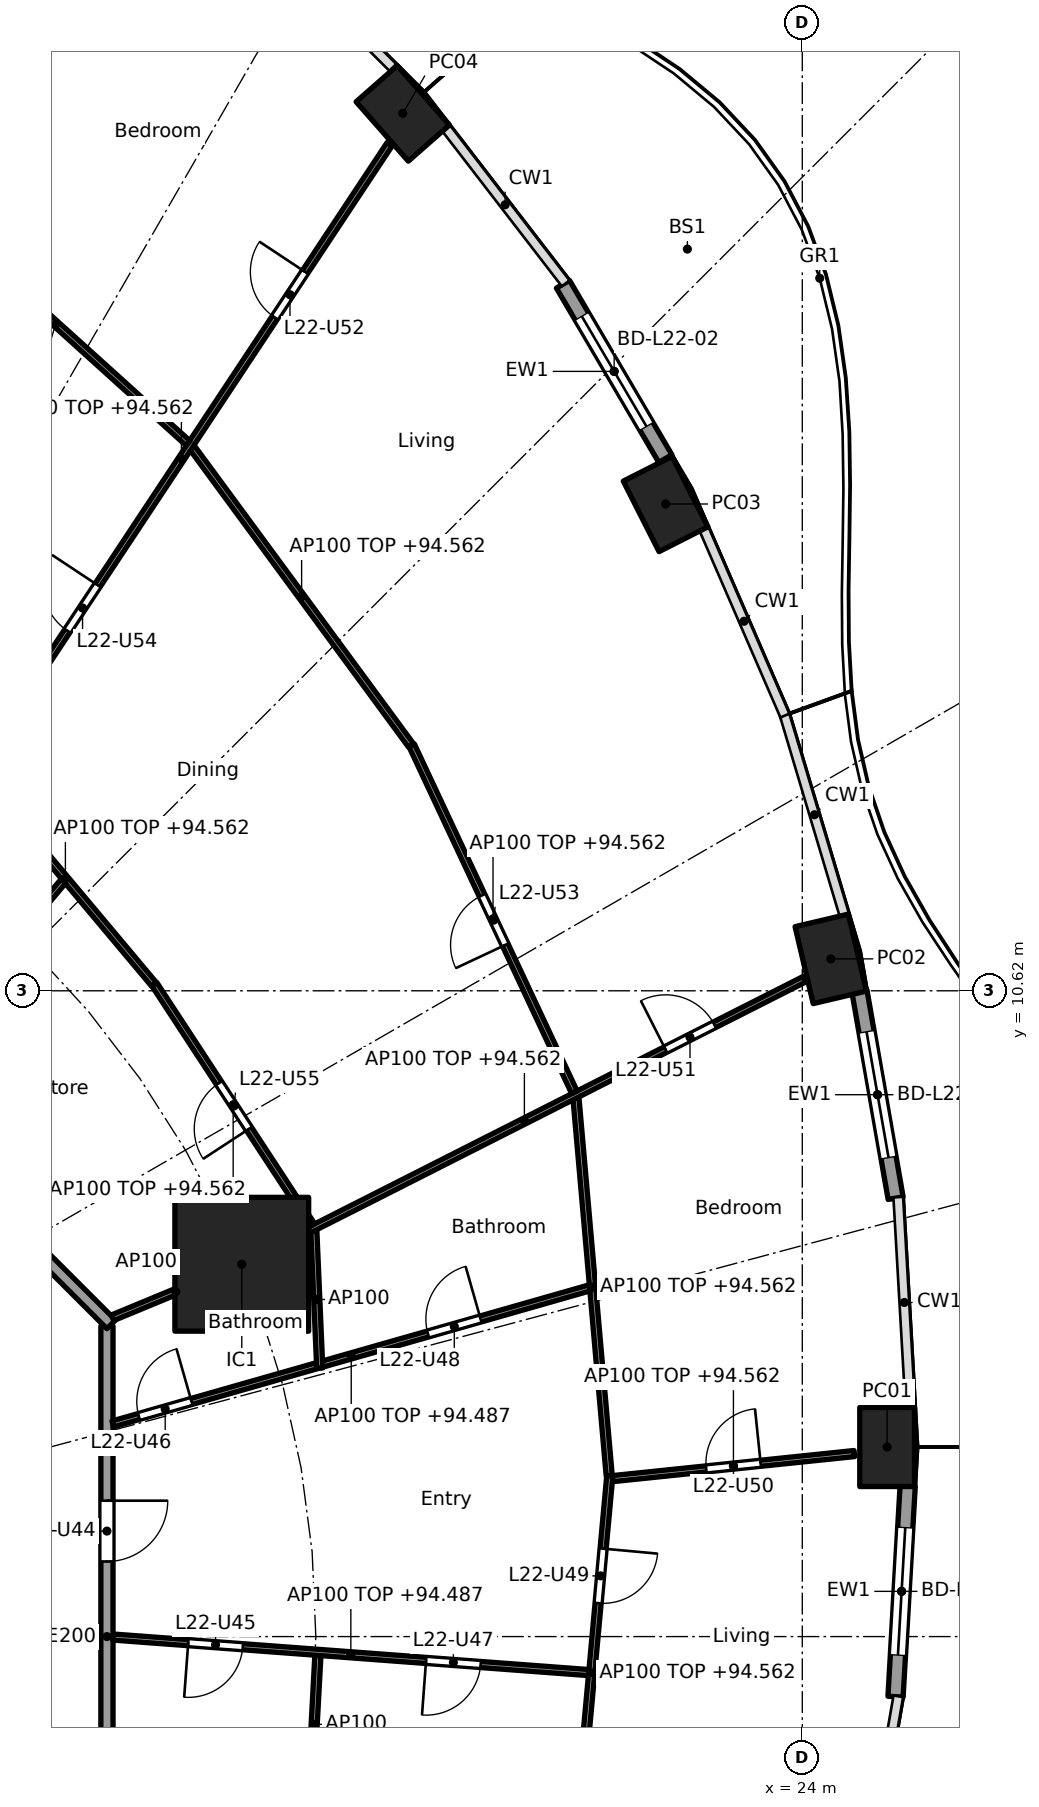
"""IFC4 building model, lengths in metres.
Left out: names, types, materials, properties, quantities, classifications, styles, units other than length and angle.
Written with IfcOpenShell. Run it as: python <this file> out.ifc"""

import sys

from ifc_helpers import new_model, si_unit, direction, frame, frame_2d, origin, origin_2d, place, context, subcontext, project, spatial, rectangle, hollow_rectangle, extrude, element, fill, save


model = new_model("IFC4")
c1 = context("Model", 3, precision=1e-05, world=origin(), true_north=direction((0.0, 1.0)))
c2 = subcontext(c1, "Body", "Model", "MODEL_VIEW")
j1 = project(units=[si_unit("LENGTHUNIT", "METRE"), si_unit("PLANEANGLEUNIT", "RADIAN")], contexts=[c1])
p1 = place(None, origin())
s1 = spatial("IfcSite", under=j1, at=p1, CompositionType="ELEMENT")
p2 = place(p1, origin())
s2 = spatial("IfcBuilding", under=s1, at=p2, CompositionType="ELEMENT")
p3 = place(p2, frame((0.0, 0.0, 91.8)))
s3 = spatial("IfcBuildingStorey", under=s2, at=p3, CompositionType="ELEMENT", Elevation=91.8)
for number, where, z_axis, x_axis in (
    (1, (25.395, 3.118, 0.0), (0.0, 0.0, 1.0), (0.0, 1.0, 0.0)),
    (2, (24.468, 11.145, 0.0), (0.0, 0.0, 1.0), (-0.229, 0.973, 0.0)),
    (3, (21.751, 18.625, 0.0), (0.0, 0.0, 1.0), (-0.452, 0.892, 0.0)),
    (4, (17.43, 25.049, 0.0), (0.0, 0.0, 1.0), (-0.66, 0.751, 0.0)),
):
    element("IfcColumn", number, at=place(p3, frame(where, z_axis=z_axis, x_axis=x_axis)), inside=s3, PredefinedType="COLUMN", context=c2, shape_type="SweptSolid", body=[
        extrude(hollow_rectangle(XDim=1.3, YDim=0.9, WallThickness=0.045, at=origin_2d()), origin(), (0.0, 0.0, 1.0), 3.7),
    ])
p4 = place(p3, frame((14.782, 6.123, 0.0), z_axis=(0.0, 0.0, 1.0), x_axis=(1.0, 0.0, 0.0)))
e5 = element("IfcColumn", 5, at=p4, inside=s3, PredefinedType="COLUMN", context=c2, shape_type="SweptSolid", body=[
    extrude(rectangle(XDim=2.2, YDim=2.2, at=origin_2d()), origin(), (0.0, 0.0, 1.0), 3.7),
])
p5 = place(p3, frame((24.94, 10.613, 0.0), z_axis=(0.0, 0.0, 1.0), x_axis=(0.172164316671, -0.985068245385, 0.0)))
e6 = element("IfcWall", 6, at=p5, inside=s3, PredefinedType="SOLIDWALL", context=c2, shape_type="SweptSolid", body=[
    extrude(rectangle(XDim=3.454, YDim=0.25, at=frame_2d((1.727, 0.0))), origin(), (0.0, 0.0, 1.0), 3.44),
])
p6 = place(p5, frame((0.677, 0.0, 0.0)))
e7 = element("IfcOpeningElement", 7, at=p6, cuts=e6, PredefinedType="OPENING", context=c2, shape_type="SweptSolid", body=[
    extrude(rectangle(XDim=2.1, YDim=2.4, at=frame_2d((1.05, 1.2))), frame((0.0, 0.135, 0.0), z_axis=(0.0, -1.0, 0.0), x_axis=(1.0, 0.0, 0.0)), (0.0, 0.0, 1.0), 0.27),
])
p7 = place(p3, frame((20.064, 22.24, 0.0), z_axis=(0.0, 0.0, 1.0), x_axis=(0.506297921217, -0.862358634775, 0.0)))
e8 = element("IfcWall", 8, at=p7, inside=s3, PredefinedType="SOLIDWALL", context=c2, shape_type="SweptSolid", body=[
    extrude(rectangle(XDim=3.325, YDim=0.25, at=frame_2d((1.662, 0.0))), origin(), (0.0, 0.0, 1.0), 3.44),
])
p8 = place(p7, frame((0.612, 0.0, 0.0)))
e9 = element("IfcOpeningElement", 9, at=p8, cuts=e8, PredefinedType="OPENING", context=c2, shape_type="SweptSolid", body=[
    extrude(rectangle(XDim=2.1, YDim=2.4, at=frame_2d((1.05, 1.2))), frame((0.0, 0.135, 0.0), z_axis=(0.0, -1.0, 0.0), x_axis=(1.0, 0.0, 0.0)), (0.0, 0.0, 1.0), 0.27),
])
p9 = place(p3, frame((25.733, 2.476, 0.0), z_axis=(0.0, 0.0, 1.0), x_axis=(-0.057542602614, -0.998343051703, 0.0)))
e10 = element("IfcWall", 10, at=p9, inside=s3, PredefinedType="SOLIDWALL", context=c2, shape_type="SweptSolid", body=[
    extrude(rectangle(XDim=3.471, YDim=0.25, at=frame_2d((1.735, 0.0))), origin(), (0.0, 0.0, 1.0), 3.44),
])
p10 = place(p9, frame((0.685, 0.0, 0.0)))
e11 = element("IfcOpeningElement", 11, at=p10, cuts=e10, PredefinedType="OPENING", context=c2, shape_type="SweptSolid", body=[
    extrude(rectangle(XDim=2.1, YDim=2.4, at=frame_2d((1.05, 1.2))), frame((0.0, 0.135, 0.0), z_axis=(0.0, -1.0, 0.0), x_axis=(1.0, 0.0, 0.0)), (0.0, 0.0, 1.0), 0.27),
])
p11 = place(p3, frame((6.141, 14.829, 0.0), z_axis=(0.0, 0.0, 1.0), x_axis=(0.354477134193, 0.935064682968, 0.0)))
e12 = element("IfcWall", 12, at=p11, inside=s3, PredefinedType="PARTITIONING", context=c2, shape_type="SweptSolid", body=[
    extrude(rectangle(XDim=15.626, YDim=0.2, at=frame_2d((7.813, 0.0))), origin(), (0.0, 0.0, 1.0), 2.762),
])
p12 = place(p3, frame((12.565, -5.104, 0.0), z_axis=(0.0, 0.0, 1.0), x_axis=(0.0, 1.0, 0.0)))
e13 = element("IfcWall", 13, at=p12, inside=s3, PredefinedType="PARTITIONING", context=c2, shape_type="SweptSolid", body=[
    extrude(rectangle(XDim=10.209, YDim=0.2, at=frame_2d((5.104, 0.0))), origin(), (0.0, 0.0, 1.0), 3.44),
])
p13 = place(p12, frame((6.339, 0.0, 0.0)))
e14 = element("IfcOpeningElement", 14, at=p13, cuts=e13, PredefinedType="OPENING", context=c2, shape_type="SweptSolid", body=[
    extrude(rectangle(XDim=1.0, YDim=2.1, at=frame_2d((0.5, 1.05))), frame((0.0, 0.11, 0.0), z_axis=(0.0, -1.0, 0.0), x_axis=(1.0, 0.0, 0.0)), (0.0, 0.0, 1.0), 0.22),
])
p14 = place(p3, frame((12.635, 5.134, 0.0), z_axis=(0.0, 0.0, 1.0), x_axis=(-0.707106781187, 0.707106781187, 0.0)))
e15 = element("IfcWall", 15, at=p14, inside=s3, PredefinedType="PARTITIONING", context=c2, shape_type="SweptSolid", body=[
    extrude(rectangle(XDim=10.609, YDim=0.2, at=frame_2d((5.305, 0.0))), origin(), (0.0, 0.0, 1.0), 3.44),
])
p15 = place(p3, frame((20.879, 2.597, 0.0), z_axis=(0.0, 0.0, 1.0), x_axis=(0.994666546694, 0.103142914868, 0.0)))
e16 = element("IfcWall", 16, at=p15, inside=s3, PredefinedType="PARTITIONING", context=c2, shape_type="SweptSolid", body=[
    extrude(rectangle(XDim=3.998, YDim=0.1, at=frame_2d((1.999, 0.0))), origin(), (0.0, 0.0, 1.0), 2.762),
])
p16 = place(p15, frame((1.549, 0.0, 0.0)))
e17 = element("IfcOpeningElement", 17, at=p16, cuts=e16, PredefinedType="OPENING", context=c2, shape_type="SweptSolid", body=[
    extrude(rectangle(XDim=0.9, YDim=2.1, at=frame_2d((0.45, 1.05))), frame((0.0, 0.06, 0.0), z_axis=(0.0, -1.0, 0.0), x_axis=(1.0, 0.0, 0.0)), (0.0, 0.0, 1.0), 0.12),
])
p17 = place(p3, frame((20.825, 2.642, 0.0), z_axis=(0.0, 0.0, 1.0), x_axis=(-0.08776129045, 0.99614153407, 0.0)))
e18 = element("IfcWall", 18, at=p17, inside=s3, PredefinedType="PARTITIONING", context=c2, shape_type="SweptSolid", body=[
    extrude(rectangle(XDim=6.237, YDim=0.1, at=frame_2d((3.119, 0.0))), origin(), (0.0, 0.0, 1.0), 2.762),
])
p18 = place(p3, frame((20.834, 2.642, 0.0), z_axis=(0.0, 0.0, 1.0), x_axis=(-0.091385407685, -0.995815599025, 0.0)))
e19 = element("IfcWall", 19, at=p18, inside=s3, PredefinedType="PARTITIONING", context=c2, shape_type="SweptSolid", body=[
    extrude(rectangle(XDim=6.502, YDim=0.1, at=frame_2d((3.251, 0.0))), origin(), (0.0, 0.0, 1.0), 2.762),
])
p19 = place(p18, frame((1.201, 0.0, 0.0)))
e20 = element("IfcOpeningElement", 20, at=p19, cuts=e19, PredefinedType="OPENING", context=c2, shape_type="SweptSolid", body=[
    extrude(rectangle(XDim=0.9, YDim=2.1, at=frame_2d((0.45, 1.05))), frame((0.0, 0.06, 0.0), z_axis=(0.0, -1.0, 0.0), x_axis=(1.0, 0.0, 0.0)), (0.0, 0.0, 1.0), 0.12),
])
p20 = place(p3, frame((12.661, 3.497, 0.0), z_axis=(0.0, 0.0, 1.0), x_axis=(0.961626678623, 0.274361314621, 0.0)))
e21 = element("IfcWall", 21, at=p20, inside=s3, PredefinedType="PARTITIONING", context=c2, shape_type="SweptSolid", body=[
    extrude(rectangle(XDim=8.156, YDim=0.1, at=frame_2d((4.078, 0.0))), origin(), (0.0, 0.0, 1.0), 2.687),
])
p21 = place(p20, frame((0.446, 0.0, 0.0)))
e22 = element("IfcOpeningElement", 22, at=p21, cuts=e21, PredefinedType="OPENING", context=c2, shape_type="SweptSolid", body=[
    extrude(rectangle(XDim=0.9, YDim=2.1, at=frame_2d((0.45, 1.05))), frame((0.0, 0.06, 0.0), z_axis=(0.0, -1.0, 0.0), x_axis=(1.0, 0.0, 0.0)), (0.0, 0.0, 1.0), 0.12),
])
p22 = place(p20, frame((5.39, 0.0, 0.0)))
e23 = element("IfcOpeningElement", 23, at=p22, cuts=e21, PredefinedType="OPENING", context=c2, shape_type="SweptSolid", body=[
    extrude(rectangle(XDim=0.9, YDim=2.1, at=frame_2d((0.45, 1.05))), frame((0.0, 0.06, 0.0), z_axis=(0.0, -1.0, 0.0), x_axis=(1.0, 0.0, 0.0)), (0.0, 0.0, 1.0), 0.12),
])
p23 = place(p3, frame((16.064, 4.415, 0.0), z_axis=(0.0, 0.0, 1.0), x_axis=(-0.043118325477, 0.999069972528, 0.0)))
e24 = element("IfcWall", 24, at=p23, inside=s3, PredefinedType="PARTITIONING", context=c2, shape_type="SweptSolid", body=[
    extrude(rectangle(XDim=2.259, YDim=0.1, at=frame_2d((1.13, 0.0))), origin(), (0.0, 0.0, 1.0), 3.44),
])
p24 = place(p3, frame((12.657, 5.243, 0.0), z_axis=(0.0, 0.0, 1.0), x_axis=(0.923848837015, 0.382757529444, 0.0)))
e25 = element("IfcWall", 25, at=p24, inside=s3, PredefinedType="PARTITIONING", context=c2, shape_type="SweptSolid", body=[
    extrude(rectangle(XDim=2.25, YDim=0.1, at=frame_2d((1.125, 0.0))), origin(), (0.0, 0.0, 1.0), 3.44),
])
p25 = place(p3, frame((14.827, 6.146, 0.0), z_axis=(0.0, 0.0, 1.0), x_axis=(0.892068075337, 0.451901038906, 0.0)))
e26 = element("IfcWall", 26, at=p25, inside=s3, PredefinedType="PARTITIONING", context=c2, shape_type="SweptSolid", body=[
    extrude(rectangle(XDim=10.32, YDim=0.1, at=frame_2d((5.16, 0.0))), origin(), (0.0, 0.0, 1.0), 2.762),
])
p26 = place(p25, frame((7.763, 0.0, 0.0)))
e27 = element("IfcOpeningElement", 27, at=p26, cuts=e26, PredefinedType="OPENING", context=c2, shape_type="SweptSolid", body=[
    extrude(rectangle(XDim=0.9, YDim=2.1, at=frame_2d((0.45, 1.05))), frame((0.0, 0.06, 0.0), z_axis=(0.0, -1.0, 0.0), x_axis=(1.0, 0.0, 0.0)), (0.0, 0.0, 1.0), 0.12),
])
p27 = place(p3, frame((15.938, 6.764, 0.0), z_axis=(0.0, 0.0, 1.0), x_axis=(-0.547472878942, 0.836823426311, 0.0)))
e28 = element("IfcWall", 28, at=p27, inside=s3, PredefinedType="PARTITIONING", context=c2, shape_type="SweptSolid", body=[
    extrude(rectangle(XDim=4.738, YDim=0.1, at=frame_2d((2.369, 0.0))), origin(), (0.0, 0.0, 1.0), 2.762),
])
p28 = place(p27, frame((1.894, 0.0, 0.0)))
e29 = element("IfcOpeningElement", 29, at=p28, cuts=e28, PredefinedType="OPENING", context=c2, shape_type="SweptSolid", body=[
    extrude(rectangle(XDim=0.9, YDim=2.1, at=frame_2d((0.45, 1.05))), frame((0.0, 0.06, 0.0), z_axis=(0.0, -1.0, 0.0), x_axis=(1.0, 0.0, 0.0)), (0.0, 0.0, 1.0), 0.12),
])
p29 = place(p3, frame((20.252, 8.95, 0.0), z_axis=(0.0, 0.0, 1.0), x_axis=(-0.424580709335, 0.905390093419, 0.0)))
e30 = element("IfcWall", 30, at=p29, inside=s3, PredefinedType="PARTITIONING", context=c2, shape_type="SweptSolid", body=[
    extrude(rectangle(XDim=6.304, YDim=0.1, at=frame_2d((3.152, 0.0))), origin(), (0.0, 0.0, 1.0), 2.762),
])
p30 = place(p29, frame((2.677, 0.0, 0.0)))
e31 = element("IfcOpeningElement", 31, at=p30, cuts=e30, PredefinedType="OPENING", context=c2, shape_type="SweptSolid", body=[
    extrude(rectangle(XDim=0.9, YDim=2.1, at=frame_2d((0.45, 1.05))), frame((0.0, 0.06, 0.0), z_axis=(0.0, -1.0, 0.0), x_axis=(1.0, 0.0, 0.0)), (0.0, 0.0, 1.0), 0.12),
])
p31 = place(p3, frame((13.339, 10.725, 0.0), z_axis=(0.0, 0.0, 1.0), x_axis=(-0.642515455924, 0.766272724882, 0.0)))
e32 = element("IfcWall", 32, at=p31, inside=s3, PredefinedType="PARTITIONING", context=c2, shape_type="SweptSolid", body=[
    extrude(rectangle(XDim=4.537, YDim=0.1, at=frame_2d((2.269, 0.0))), origin(), (0.0, 0.0, 1.0), 2.762),
])
p32 = place(p3, frame((17.567, 14.653, 0.0), z_axis=(0.0, 0.0, 1.0), x_axis=(-0.592391983588, 0.80564988536, 0.0)))
e33 = element("IfcWall", 33, at=p32, inside=s3, PredefinedType="PARTITIONING", context=c2, shape_type="SweptSolid", body=[
    extrude(rectangle(XDim=6.08, YDim=0.1, at=frame_2d((3.04, 0.0))), origin(), (0.0, 0.0, 1.0), 2.762),
])
p33 = place(p3, frame((8.949, 8.961, 0.0), z_axis=(0.0, 0.0, 1.0), x_axis=(0.642048217601, 0.766664259162, 0.0)))
e34 = element("IfcWall", 34, at=p33, inside=s3, PredefinedType="PARTITIONING", context=c2, shape_type="SweptSolid", body=[
    extrude(rectangle(XDim=4.518, YDim=0.1, at=frame_2d((2.259, 0.0))), origin(), (0.0, 0.0, 1.0), 2.687),
])
p34 = place(p3, frame((10.364, 14.198, 0.0), z_axis=(0.0, 0.0, 1.0), x_axis=(0.552104552927, 0.833774887267, 0.0)))
e35 = element("IfcWall", 35, at=p34, inside=s3, PredefinedType="PARTITIONING", context=c2, shape_type="SweptSolid", body=[
    extrude(rectangle(XDim=12.407, YDim=0.1, at=frame_2d((6.203, 0.0))), origin(), (0.0, 0.0, 1.0), 2.762),
])
p35 = place(p34, frame((8.988, 0.0, 0.0)))
e36 = element("IfcOpeningElement", 36, at=p35, cuts=e35, PredefinedType="OPENING", context=c2, shape_type="SweptSolid", body=[
    extrude(rectangle(XDim=0.9, YDim=2.1, at=frame_2d((0.45, 1.05))), frame((0.0, 0.06, 0.0), z_axis=(0.0, -1.0, 0.0), x_axis=(1.0, 0.0, 0.0)), (0.0, 0.0, 1.0), 0.12),
])
p36 = place(p34, frame((2.809, 0.0, 0.0)))
e37 = element("IfcOpeningElement", 37, at=p36, cuts=e35, PredefinedType="OPENING", context=c2, shape_type="SweptSolid", body=[
    extrude(rectangle(XDim=0.9, YDim=2.1, at=frame_2d((0.45, 1.05))), frame((0.0, 0.06, 0.0), z_axis=(0.0, -1.0, 0.0), x_axis=(1.0, 0.0, 0.0)), (0.0, 0.0, 1.0), 0.12),
])
p37 = place(p3, frame((13.898, 19.625, 0.0), z_axis=(0.0, 0.0, 1.0), x_axis=(-0.742396654702, 0.669960601146, 0.0)))
e38 = element("IfcWall", 38, at=p37, inside=s3, PredefinedType="PARTITIONING", context=c2, shape_type="SweptSolid", body=[
    extrude(rectangle(XDim=5.861, YDim=0.1, at=frame_2d((2.931, 0.0))), origin(), (0.0, 0.0, 1.0), 2.762),
])
p38 = place(p3, frame((15.912, -2.577, 0.0), z_axis=(0.0, 0.0, 1.0), x_axis=(0.053749298185, 0.998554461682, 0.0)))
e39 = element("IfcWall", 39, at=p38, inside=s3, PredefinedType="PARTITIONING", context=c2, shape_type="SweptSolid", body=[
    extrude(rectangle(XDim=2.271, YDim=0.1, at=frame_2d((1.135, 0.0))), origin(), (0.0, 0.0, 1.0), 3.44),
])
p39 = place(p3, frame((12.665, -0.008, 0.0), z_axis=(0.0, 0.0, 1.0), x_axis=(0.997222647159, -0.074478130978, 0.0)))
e40 = element("IfcWall", 40, at=p39, inside=s3, PredefinedType="PARTITIONING", context=c2, shape_type="SweptSolid", body=[
    extrude(rectangle(XDim=7.844, YDim=0.1, at=frame_2d((3.922, 0.0))), origin(), (0.0, 0.0, 1.0), 2.687),
])
p40 = place(p39, frame((1.241, 0.0, 0.0)))
e41 = element("IfcOpeningElement", 41, at=p40, cuts=e40, PredefinedType="OPENING", context=c2, shape_type="SweptSolid", body=[
    extrude(rectangle(XDim=0.9, YDim=2.1, at=frame_2d((0.45, 1.05))), frame((0.0, 0.06, 0.0), z_axis=(0.0, -1.0, 0.0), x_axis=(1.0, 0.0, 0.0)), (0.0, 0.0, 1.0), 0.12),
])
p41 = place(p39, frame((5.163, 0.0, 0.0)))
e42 = element("IfcOpeningElement", 42, at=p41, cuts=e40, PredefinedType="OPENING", context=c2, shape_type="SweptSolid", body=[
    extrude(rectangle(XDim=0.9, YDim=2.1, at=frame_2d((0.45, 1.05))), frame((0.0, 0.06, 0.0), z_axis=(0.0, -1.0, 0.0), x_axis=(1.0, 0.0, 0.0)), (0.0, 0.0, 1.0), 0.12),
])
p42 = place(p6, origin())
e43 = element("IfcDoor", 43, at=p42, inside=s3, OperationType="SLIDING_TO_LEFT", PredefinedType="DOOR", context=c2, shape_type="SweptSolid", body=[
    extrude(rectangle(XDim=2.1, YDim=2.4, at=frame_2d((1.05, 1.2))), frame((0.0, 0.025, 0.0), z_axis=(0.0, -1.0, 0.0), x_axis=(1.0, 0.0, 0.0)), (0.0, 0.0, 1.0), 0.05),
])
fill(e7, e43)
p43 = place(p8, origin())
e44 = element("IfcDoor", 44, at=p43, inside=s3, OperationType="SLIDING_TO_LEFT", PredefinedType="DOOR", context=c2, shape_type="SweptSolid", body=[
    extrude(rectangle(XDim=2.1, YDim=2.4, at=frame_2d((1.05, 1.2))), frame((0.0, 0.025, 0.0), z_axis=(0.0, -1.0, 0.0), x_axis=(1.0, 0.0, 0.0)), (0.0, 0.0, 1.0), 0.05),
])
fill(e9, e44)
p44 = place(p10, origin())
e45 = element("IfcDoor", 45, at=p44, inside=s3, OperationType="SLIDING_TO_LEFT", PredefinedType="DOOR", context=c2, shape_type="SweptSolid", body=[
    extrude(rectangle(XDim=2.1, YDim=2.4, at=frame_2d((1.05, 1.2))), frame((0.0, 0.025, 0.0), z_axis=(0.0, -1.0, 0.0), x_axis=(1.0, 0.0, 0.0)), (0.0, 0.0, 1.0), 0.05),
])
fill(e11, e45)
p45 = place(p13, frame((1.0, 0.0, 0.0), x_axis=(-1.0, 0.0, 0.0)))
e46 = element("IfcDoor", 46, at=p45, inside=s3, OperationType="SINGLE_SWING_LEFT", PredefinedType="DOOR", context=c2, shape_type="SweptSolid", body=[
    extrude(rectangle(XDim=1.0, YDim=2.1, at=frame_2d((0.5, 1.05))), frame((0.0, 0.025, 0.0), z_axis=(0.0, -1.0, 0.0), x_axis=(1.0, 0.0, 0.0)), (0.0, 0.0, 1.0), 0.05),
])
fill(e14, e46)
p46 = place(p40, frame((0.9, 0.0, 0.0), x_axis=(-1.0, 0.0, 0.0)))
e47 = element("IfcDoor", 47, at=p46, inside=s3, OperationType="SINGLE_SWING_RIGHT", PredefinedType="DOOR", context=c2, shape_type="SweptSolid", body=[
    extrude(rectangle(XDim=0.9, YDim=2.1, at=frame_2d((0.45, 1.05))), frame((0.0, 0.025, 0.0), z_axis=(0.0, -1.0, 0.0), x_axis=(1.0, 0.0, 0.0)), (0.0, 0.0, 1.0), 0.05),
])
fill(e41, e47)
p47 = place(p21, origin())
e48 = element("IfcDoor", 48, at=p47, inside=s3, OperationType="SINGLE_SWING_RIGHT", PredefinedType="DOOR", context=c2, shape_type="SweptSolid", body=[
    extrude(rectangle(XDim=0.9, YDim=2.1, at=frame_2d((0.45, 1.05))), frame((0.0, 0.025, 0.0), z_axis=(0.0, -1.0, 0.0), x_axis=(1.0, 0.0, 0.0)), (0.0, 0.0, 1.0), 0.05),
])
fill(e22, e48)
p48 = place(p41, frame((0.9, 0.0, 0.0), x_axis=(-1.0, 0.0, 0.0)))
e49 = element("IfcDoor", 49, at=p48, inside=s3, OperationType="SINGLE_SWING_RIGHT", PredefinedType="DOOR", context=c2, shape_type="SweptSolid", body=[
    extrude(rectangle(XDim=0.9, YDim=2.1, at=frame_2d((0.45, 1.05))), frame((0.0, 0.025, 0.0), z_axis=(0.0, -1.0, 0.0), x_axis=(1.0, 0.0, 0.0)), (0.0, 0.0, 1.0), 0.05),
])
fill(e42, e49)
p49 = place(p22, origin())
e50 = element("IfcDoor", 50, at=p49, inside=s3, OperationType="SINGLE_SWING_RIGHT", PredefinedType="DOOR", context=c2, shape_type="SweptSolid", body=[
    extrude(rectangle(XDim=0.9, YDim=2.1, at=frame_2d((0.45, 1.05))), frame((0.0, 0.025, 0.0), z_axis=(0.0, -1.0, 0.0), x_axis=(1.0, 0.0, 0.0)), (0.0, 0.0, 1.0), 0.05),
])
fill(e23, e50)
p50 = place(p19, origin())
e51 = element("IfcDoor", 51, at=p50, inside=s3, OperationType="SINGLE_SWING_LEFT", PredefinedType="DOOR", context=c2, shape_type="SweptSolid", body=[
    extrude(rectangle(XDim=0.9, YDim=2.1, at=frame_2d((0.45, 1.05))), frame((0.0, 0.025, 0.0), z_axis=(0.0, -1.0, 0.0), x_axis=(1.0, 0.0, 0.0)), (0.0, 0.0, 1.0), 0.05),
])
fill(e20, e51)
p51 = place(p16, origin())
e52 = element("IfcDoor", 52, at=p51, inside=s3, OperationType="SINGLE_SWING_RIGHT", PredefinedType="DOOR", context=c2, shape_type="SweptSolid", body=[
    extrude(rectangle(XDim=0.9, YDim=2.1, at=frame_2d((0.45, 1.05))), frame((0.0, 0.025, 0.0), z_axis=(0.0, -1.0, 0.0), x_axis=(1.0, 0.0, 0.0)), (0.0, 0.0, 1.0), 0.05),
])
fill(e17, e52)
p52 = place(p26, origin())
e53 = element("IfcDoor", 53, at=p52, inside=s3, OperationType="SINGLE_SWING_LEFT", PredefinedType="DOOR", context=c2, shape_type="SweptSolid", body=[
    extrude(rectangle(XDim=0.9, YDim=2.1, at=frame_2d((0.45, 1.05))), frame((0.0, 0.025, 0.0), z_axis=(0.0, -1.0, 0.0), x_axis=(1.0, 0.0, 0.0)), (0.0, 0.0, 1.0), 0.05),
])
fill(e27, e53)
p53 = place(p35, origin())
e54 = element("IfcDoor", 54, at=p53, inside=s3, OperationType="SINGLE_SWING_RIGHT", PredefinedType="DOOR", context=c2, shape_type="SweptSolid", body=[
    extrude(rectangle(XDim=0.9, YDim=2.1, at=frame_2d((0.45, 1.05))), frame((0.0, 0.025, 0.0), z_axis=(0.0, -1.0, 0.0), x_axis=(1.0, 0.0, 0.0)), (0.0, 0.0, 1.0), 0.05),
])
fill(e36, e54)
p54 = place(p30, origin())
e55 = element("IfcDoor", 55, at=p54, inside=s3, OperationType="SINGLE_SWING_LEFT", PredefinedType="DOOR", context=c2, shape_type="SweptSolid", body=[
    extrude(rectangle(XDim=0.9, YDim=2.1, at=frame_2d((0.45, 1.05))), frame((0.0, 0.025, 0.0), z_axis=(0.0, -1.0, 0.0), x_axis=(1.0, 0.0, 0.0)), (0.0, 0.0, 1.0), 0.05),
])
fill(e31, e55)
p55 = place(p36, origin())
e56 = element("IfcDoor", 56, at=p55, inside=s3, OperationType="SINGLE_SWING_RIGHT", PredefinedType="DOOR", context=c2, shape_type="SweptSolid", body=[
    extrude(rectangle(XDim=0.9, YDim=2.1, at=frame_2d((0.45, 1.05))), frame((0.0, 0.025, 0.0), z_axis=(0.0, -1.0, 0.0), x_axis=(1.0, 0.0, 0.0)), (0.0, 0.0, 1.0), 0.05),
])
fill(e37, e56)
p56 = place(p28, origin())
e57 = element("IfcDoor", 57, at=p56, inside=s3, OperationType="SINGLE_SWING_LEFT", PredefinedType="DOOR", context=c2, shape_type="SweptSolid", body=[
    extrude(rectangle(XDim=0.9, YDim=2.1, at=frame_2d((0.45, 1.05))), frame((0.0, 0.025, 0.0), z_axis=(0.0, -1.0, 0.0), x_axis=(1.0, 0.0, 0.0)), (0.0, 0.0, 1.0), 0.05),
])
fill(e29, e57)
save(model, sys.argv[1])
